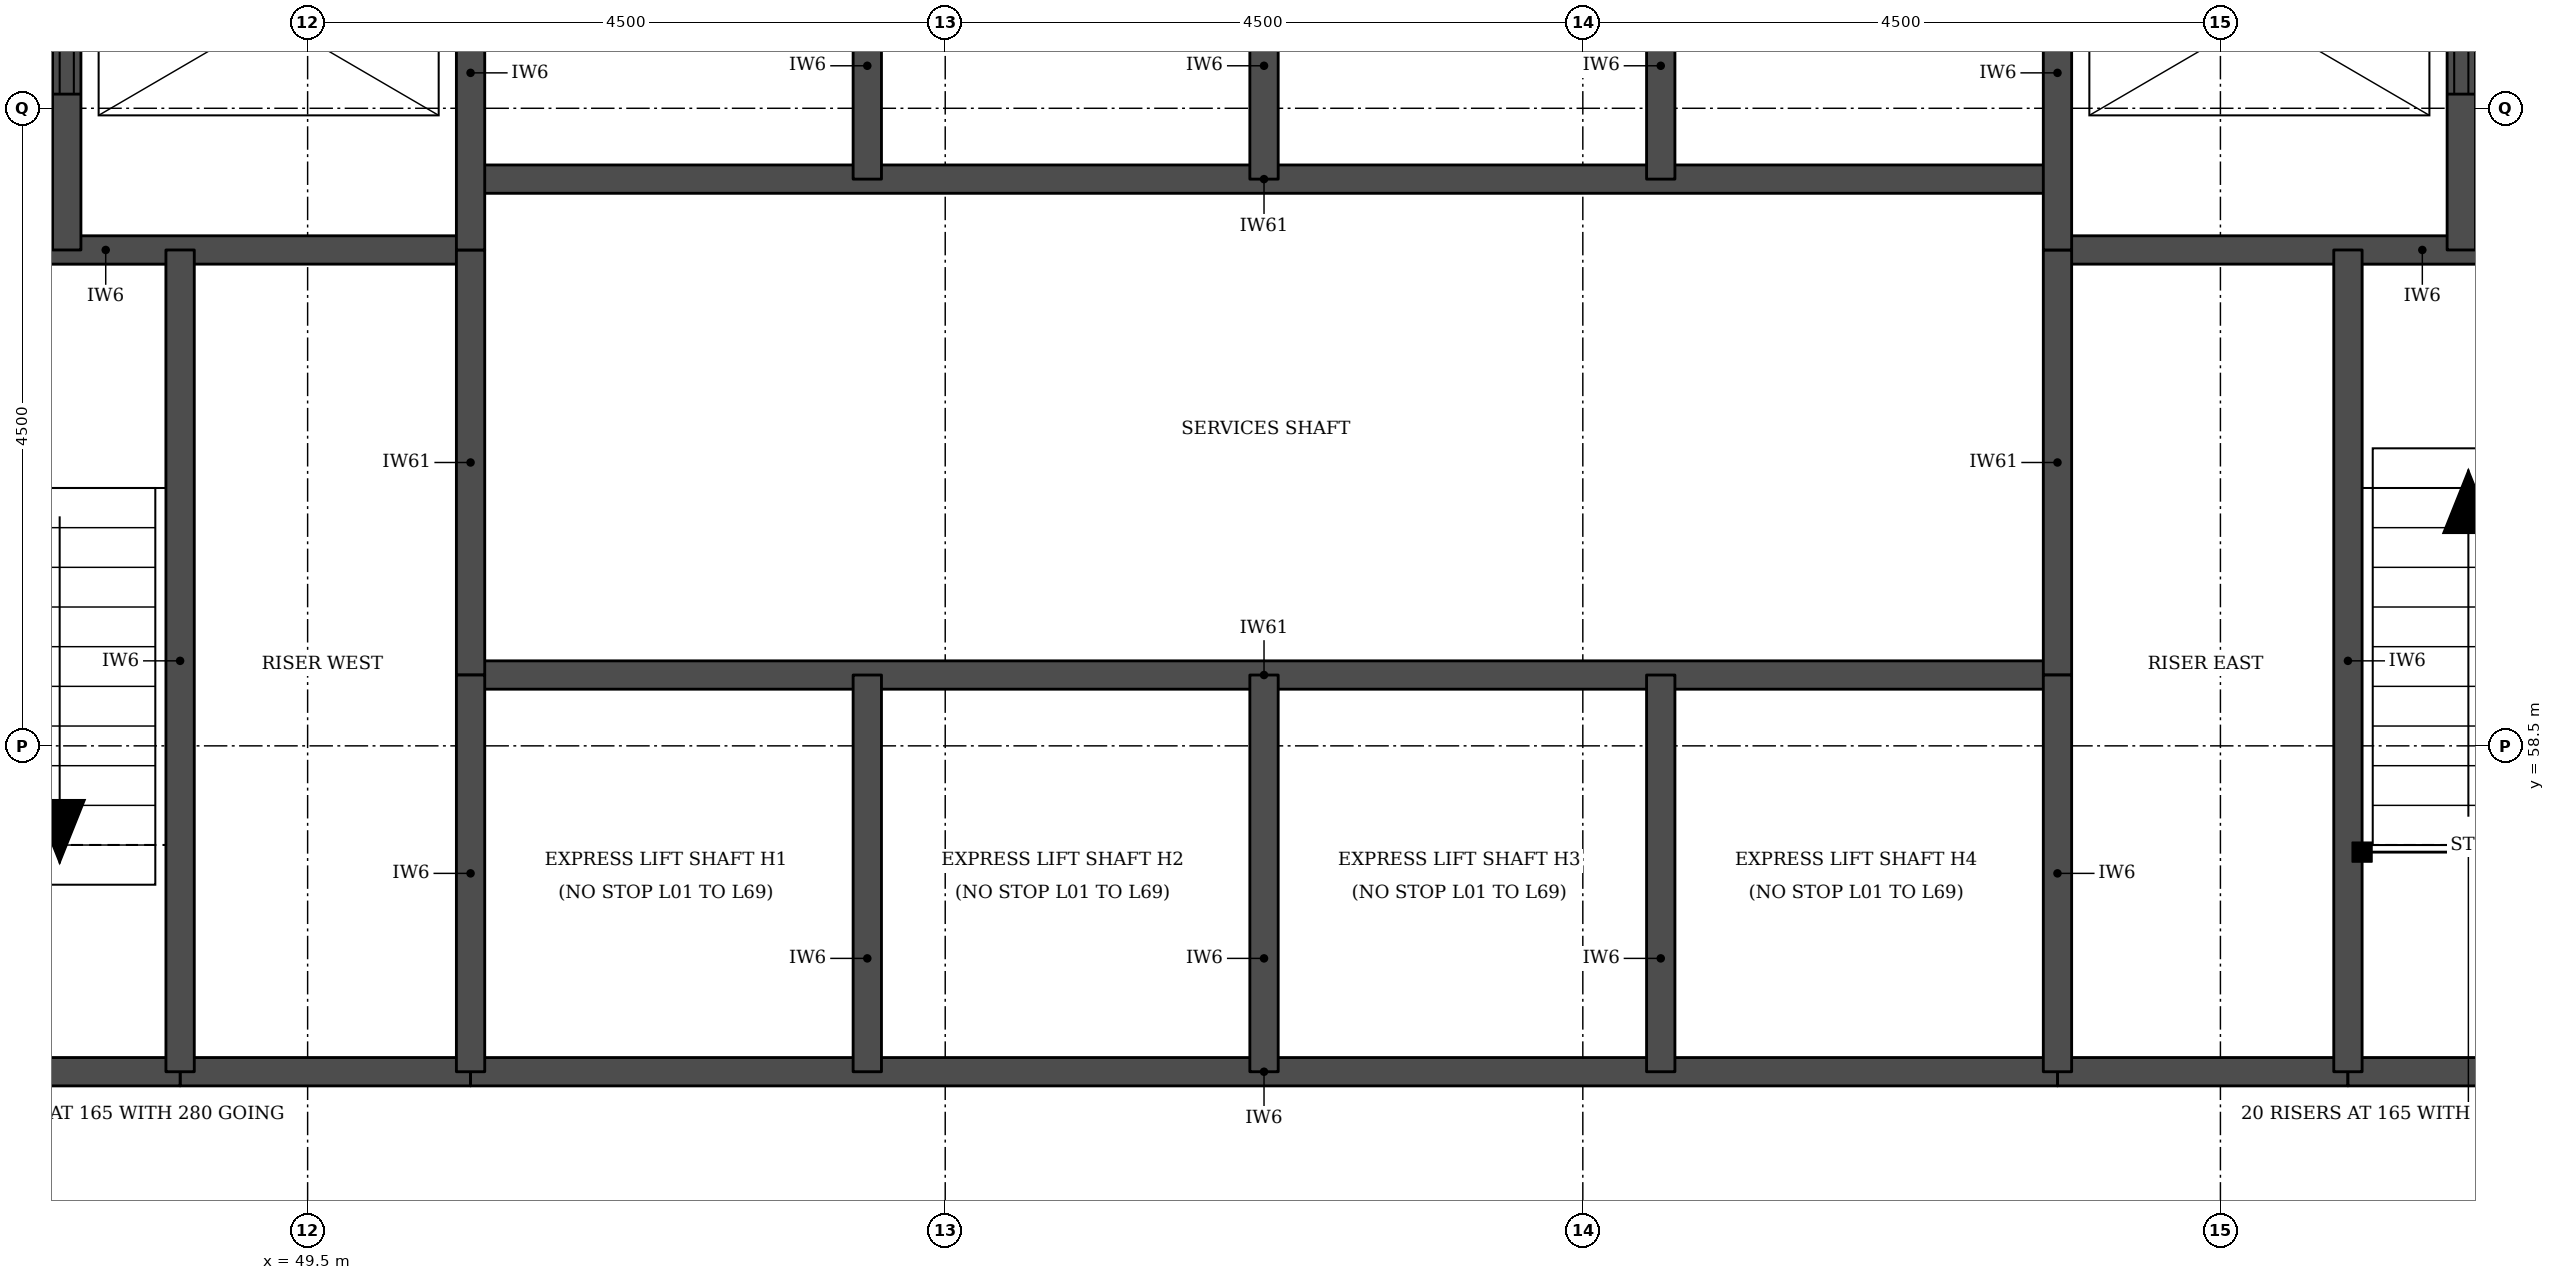
"""IFC4 building model, lengths in metres.
Left out: names, types, materials, properties, quantities, classifications, styles, units other than length and angle.
Written with IfcOpenShell. Run it as: python <this file> out.ifc"""

import sys

from ifc_helpers import new_model, si_unit, direction, frame, frame_2d, origin, place, context, subcontext, project, spatial, rectangle, extrude, element, fill, save


model = new_model("IFC4")
c1 = context("Model", 3, precision=1e-05, world=origin(), true_north=direction((0.0, 1.0)))
c2 = subcontext(c1, "Body", "Model", "MODEL_VIEW")
j1 = project(units=[si_unit("LENGTHUNIT", "METRE"), si_unit("PLANEANGLEUNIT", "RADIAN")], contexts=[c1])
p1 = place(None, origin())
s1 = spatial("IfcSite", under=j1, at=p1, CompositionType="ELEMENT")
p2 = place(p1, origin())
s2 = spatial("IfcBuilding", under=s1, at=p2, CompositionType="ELEMENT")
p3 = place(p2, frame((0.0, 0.0, 62.7)))
s3 = spatial("IfcBuildingStorey", under=s2, at=p3, CompositionType="ELEMENT", Elevation=62.7)
for number, where, z_axis, x_axis in (
    (1, (48.6, 56.2, 0.0), (0.0, 0.0, 1.0), (1.0, 0.0, 0.0)),
    (2, (61.85, 56.2, 0.0), (0.0, 0.0, 1.0), (1.0, 0.0, 0.0)),
):
    element("IfcWall", number, at=place(p3, frame(where, z_axis=z_axis, x_axis=x_axis)), inside=s3, PredefinedType="SOLIDWALL", context=c2, shape_type="SweptSolid", body=[
        extrude(rectangle(XDim=2.05, YDim=0.2, at=frame_2d((1.025, 0.0))), origin(), (0.0, 0.0, 1.0), 3.08),
    ])
p4 = place(p3, frame((45.5, 56.2, 0.0), z_axis=(0.0, 0.0, 1.0), x_axis=(1.0, 0.0, 0.0)))
e3 = element("IfcWall", 3, at=p4, inside=s3, PredefinedType="SOLIDWALL", context=c2, shape_type="SweptSolid", body=[
    extrude(rectangle(XDim=3.1, YDim=0.2, at=frame_2d((1.55, 0.0))), origin(), (0.0, 0.0, 1.0), 3.08),
])
p5 = place(p3, frame((50.65, 56.2, 0.0), z_axis=(0.0, 0.0, 1.0), x_axis=(1.0, 0.0, 0.0)))
e4 = element("IfcWall", 4, at=p5, inside=s3, PredefinedType="SOLIDWALL", context=c2, shape_type="SweptSolid", body=[
    extrude(rectangle(XDim=11.2, YDim=0.2, at=frame_2d((5.6, 0.0))), origin(), (0.0, 0.0, 1.0), 3.08),
])
p6 = place(p3, frame((63.9, 56.2, 0.0), z_axis=(0.0, 0.0, 1.0), x_axis=(1.0, 0.0, 0.0)))
e5 = element("IfcWall", 5, at=p6, inside=s3, PredefinedType="SOLIDWALL", context=c2, shape_type="SweptSolid", body=[
    extrude(rectangle(XDim=3.1, YDim=0.2, at=frame_2d((1.55, 0.0))), origin(), (0.0, 0.0, 1.0), 3.08),
])
p7 = place(p3, frame((50.65, 59.0, 0.0), z_axis=(0.0, 0.0, 1.0), x_axis=(1.0, 0.0, 0.0)))
e6 = element("IfcWall", 6, at=p7, inside=s3, PredefinedType="SOLIDWALL", context=c2, shape_type="SweptSolid", body=[
    extrude(rectangle(XDim=11.2, YDim=0.2, at=frame_2d((5.6, 0.0))), origin(), (0.0, 0.0, 1.0), 3.3),
])
for number, where, z_axis, x_axis in (
    (7, (45.5, 62.0, 0.0), (0.0, 0.0, 1.0), (1.0, 0.0, 0.0)),
    (8, (61.85, 62.0, 0.0), (0.0, 0.0, 1.0), (1.0, 0.0, 0.0)),
):
    element("IfcWall", number, at=place(p3, frame(where, z_axis=z_axis, x_axis=x_axis)), inside=s3, PredefinedType="SOLIDWALL", context=c2, shape_type="SweptSolid", body=[
        extrude(rectangle(XDim=5.15, YDim=0.2, at=frame_2d((2.575, 0.0))), origin(), (0.0, 0.0, 1.0), 3.08),
    ])
p8 = place(p3, frame((50.65, 62.5, 0.0), z_axis=(0.0, 0.0, 1.0), x_axis=(1.0, 0.0, 0.0)))
e9 = element("IfcWall", 9, at=p8, inside=s3, PredefinedType="SOLIDWALL", context=c2, shape_type="SweptSolid", body=[
    extrude(rectangle(XDim=11.2, YDim=0.2, at=frame_2d((5.6, 0.0))), origin(), (0.0, 0.0, 1.0), 3.3),
])
p9 = place(p3, frame((47.8, 62.0, 0.0), z_axis=(0.0, 0.0, 1.0), x_axis=(0.0, 1.0, 0.0)))
e10 = element("IfcWall", 10, at=p9, inside=s3, PredefinedType="SOLIDWALL", context=c2, shape_type="SweptSolid", body=[
    extrude(rectangle(XDim=3.3, YDim=0.2, at=frame_2d((1.65, 0.0))), origin(), (0.0, 0.0, 1.0), 3.08),
])
p10 = place(p9, frame((1.1, 0.0, 0.0)))
e11 = element("IfcOpeningElement", 11, at=p10, cuts=e10, PredefinedType="OPENING", context=c2, shape_type="SweptSolid", body=[
    extrude(rectangle(XDim=1.1, YDim=2.1, at=frame_2d((0.55, 1.05))), frame((0.0, 0.11, 0.0), z_axis=(0.0, -1.0, 0.0), x_axis=(1.0, 0.0, 0.0)), (0.0, 0.0, 1.0), 0.22),
])
p11 = place(p3, frame((48.6, 56.2, 0.0), z_axis=(0.0, 0.0, 1.0), x_axis=(0.0, 1.0, 0.0)))
e12 = element("IfcWall", 12, at=p11, inside=s3, PredefinedType="SOLIDWALL", context=c2, shape_type="SweptSolid", body=[
    extrude(rectangle(XDim=5.8, YDim=0.2, at=frame_2d((2.9, 0.0))), origin(), (0.0, 0.0, 1.0), 3.08),
])
p12 = place(p3, frame((50.65, 59.0, 0.0), z_axis=(0.0, 0.0, 1.0), x_axis=(0.0, 1.0, 0.0)))
e13 = element("IfcWall", 13, at=p12, inside=s3, PredefinedType="SOLIDWALL", context=c2, shape_type="SweptSolid", body=[
    extrude(rectangle(XDim=3.0, YDim=0.2, at=frame_2d((1.5, 0.0))), origin(), (0.0, 0.0, 1.0), 3.3),
])
p13 = place(p3, frame((50.65, 56.2, 0.0), z_axis=(0.0, 0.0, 1.0), x_axis=(0.0, 1.0, 0.0)))
e14 = element("IfcWall", 14, at=p13, inside=s3, PredefinedType="SOLIDWALL", context=c2, shape_type="SweptSolid", body=[
    extrude(rectangle(XDim=2.8, YDim=0.2, at=frame_2d((1.4, 0.0))), origin(), (0.0, 0.0, 1.0), 3.08),
])
p14 = place(p3, frame((50.65, 62.0, 0.0), z_axis=(0.0, 0.0, 1.0), x_axis=(0.0, 1.0, 0.0)))
e15 = element("IfcWall", 15, at=p14, inside=s3, PredefinedType="SOLIDWALL", context=c2, shape_type="SweptSolid", body=[
    extrude(rectangle(XDim=3.3, YDim=0.2, at=frame_2d((1.65, 0.0))), origin(), (0.0, 0.0, 1.0), 3.08),
])
for number, where, z_axis, x_axis in (
    (16, (53.45, 56.2, 0.0), (0.0, 0.0, 1.0), (0.0, 1.0, 0.0)),
    (17, (53.45, 62.5, 0.0), (0.0, 0.0, 1.0), (0.0, 1.0, 0.0)),
    (18, (56.25, 56.2, 0.0), (0.0, 0.0, 1.0), (0.0, 1.0, 0.0)),
    (19, (56.25, 62.5, 0.0), (0.0, 0.0, 1.0), (0.0, 1.0, 0.0)),
    (20, (59.05, 56.2, 0.0), (0.0, 0.0, 1.0), (0.0, 1.0, 0.0)),
    (21, (59.05, 62.5, 0.0), (0.0, 0.0, 1.0), (0.0, 1.0, 0.0)),
):
    element("IfcWall", number, at=place(p3, frame(where, z_axis=z_axis, x_axis=x_axis)), inside=s3, PredefinedType="SOLIDWALL", context=c2, shape_type="SweptSolid", body=[
        extrude(rectangle(XDim=2.8, YDim=0.2, at=frame_2d((1.4, 0.0))), origin(), (0.0, 0.0, 1.0), 3.08),
    ])
p15 = place(p3, frame((61.85, 59.0, 0.0), z_axis=(0.0, 0.0, 1.0), x_axis=(0.0, 1.0, 0.0)))
e22 = element("IfcWall", 22, at=p15, inside=s3, PredefinedType="SOLIDWALL", context=c2, shape_type="SweptSolid", body=[
    extrude(rectangle(XDim=3.0, YDim=0.2, at=frame_2d((1.5, 0.0))), origin(), (0.0, 0.0, 1.0), 3.3),
])
p16 = place(p3, frame((61.85, 56.2, 0.0), z_axis=(0.0, 0.0, 1.0), x_axis=(0.0, 1.0, 0.0)))
e23 = element("IfcWall", 23, at=p16, inside=s3, PredefinedType="SOLIDWALL", context=c2, shape_type="SweptSolid", body=[
    extrude(rectangle(XDim=2.8, YDim=0.2, at=frame_2d((1.4, 0.0))), origin(), (0.0, 0.0, 1.0), 3.08),
])
p17 = place(p3, frame((61.85, 62.0, 0.0), z_axis=(0.0, 0.0, 1.0), x_axis=(0.0, 1.0, 0.0)))
e24 = element("IfcWall", 24, at=p17, inside=s3, PredefinedType="SOLIDWALL", context=c2, shape_type="SweptSolid", body=[
    extrude(rectangle(XDim=3.3, YDim=0.2, at=frame_2d((1.65, 0.0))), origin(), (0.0, 0.0, 1.0), 3.08),
])
p18 = place(p3, frame((63.9, 56.2, 0.0), z_axis=(0.0, 0.0, 1.0), x_axis=(0.0, 1.0, 0.0)))
e25 = element("IfcWall", 25, at=p18, inside=s3, PredefinedType="SOLIDWALL", context=c2, shape_type="SweptSolid", body=[
    extrude(rectangle(XDim=5.8, YDim=0.2, at=frame_2d((2.9, 0.0))), origin(), (0.0, 0.0, 1.0), 3.08),
])
p19 = place(p3, frame((64.7, 62.0, 0.0), z_axis=(0.0, 0.0, 1.0), x_axis=(0.0, 1.0, 0.0)))
e26 = element("IfcWall", 26, at=p19, inside=s3, PredefinedType="SOLIDWALL", context=c2, shape_type="SweptSolid", body=[
    extrude(rectangle(XDim=3.3, YDim=0.2, at=frame_2d((1.65, 0.0))), origin(), (0.0, 0.0, 1.0), 3.08),
])
p20 = place(p19, frame((1.1, 0.0, 0.0)))
e27 = element("IfcOpeningElement", 27, at=p20, cuts=e26, PredefinedType="OPENING", context=c2, shape_type="SweptSolid", body=[
    extrude(rectangle(XDim=1.1, YDim=2.1, at=frame_2d((0.55, 1.05))), frame((0.0, 0.11, 0.0), z_axis=(0.0, -1.0, 0.0), x_axis=(1.0, 0.0, 0.0)), (0.0, 0.0, 1.0), 0.22),
])
p21 = place(p10, origin())
e28 = element("IfcDoor", 28, at=p21, inside=s3, OperationType="DOUBLE_DOOR_SLIDING", PredefinedType="DOOR", context=c2, shape_type="SweptSolid", body=[
    extrude(rectangle(XDim=1.1, YDim=2.1, at=frame_2d((0.55, 1.05))), frame((0.0, 0.025, 0.0), z_axis=(0.0, -1.0, 0.0), x_axis=(1.0, 0.0, 0.0)), (0.0, 0.0, 1.0), 0.05),
])
fill(e11, e28)
p22 = place(p20, origin())
e29 = element("IfcDoor", 29, at=p22, inside=s3, OperationType="DOUBLE_DOOR_SLIDING", PredefinedType="DOOR", context=c2, shape_type="SweptSolid", body=[
    extrude(rectangle(XDim=1.1, YDim=2.1, at=frame_2d((0.55, 1.05))), frame((0.0, 0.025, 0.0), z_axis=(0.0, -1.0, 0.0), x_axis=(1.0, 0.0, 0.0)), (0.0, 0.0, 1.0), 0.05),
])
fill(e27, e29)
save(model, sys.argv[1])
